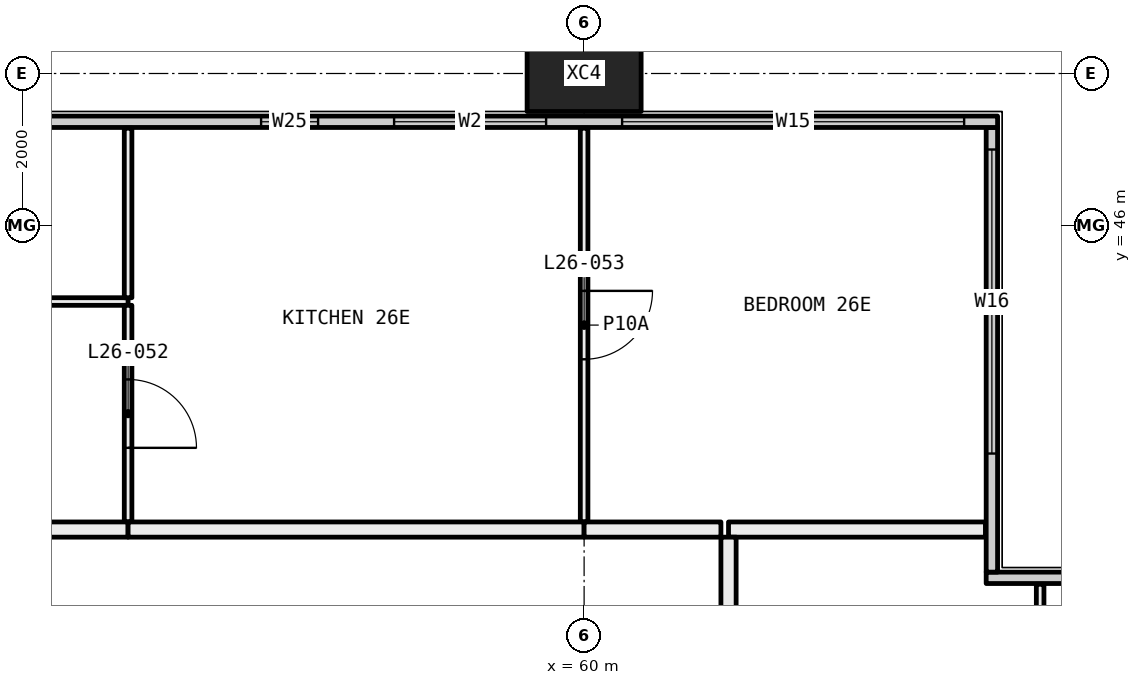
"""IFC4 building model, lengths in metres.
Left out: names, types, materials, properties, quantities, classifications, styles, units other than length and angle.
Written with IfcOpenShell. Run it as: python <this file> out.ifc"""

import sys

from ifc_helpers import new_model, si_unit, direction, frame, frame_2d, origin, origin_2d, place, context, subcontext, project, spatial, rectangle, hollow_rectangle, extrude, element, fill, save


model = new_model("IFC4")
c1 = context("Model", 3, precision=1e-05, world=origin(), true_north=direction((0.0, 1.0)))
c2 = subcontext(c1, "Body", "Model", "MODEL_VIEW")
j1 = project(units=[si_unit("LENGTHUNIT", "METRE"), si_unit("PLANEANGLEUNIT", "RADIAN")], contexts=[c1])
p1 = place(None, origin())
s1 = spatial("IfcSite", under=j1, at=p1, CompositionType="ELEMENT")
p2 = place(p1, origin())
s2 = spatial("IfcBuilding", under=s1, at=p2, CompositionType="ELEMENT")
p3 = place(p2, frame((0.0, 0.0, 103.5)))
s3 = spatial("IfcBuildingStorey", under=s2, at=p3, CompositionType="ELEMENT", Elevation=103.5)
p4 = place(p3, frame((60.0, 48.0, -0.4), z_axis=(0.0, 0.0, 1.0), x_axis=(1.0, 0.0, 0.0)))
e1 = element("IfcColumn", 1, at=p4, inside=s3, PredefinedType="COLUMN", context=c2, shape_type="SweptSolid", body=[
    extrude(hollow_rectangle(XDim=1.5, YDim=1.0, WallThickness=0.06, at=origin_2d()), origin(), (0.0, 0.0, 1.0), 3.45),
])
p5 = place(p3, frame((65.29, 41.365, 0.0), z_axis=(0.0, 0.0, 1.0), x_axis=(1.0, 0.0, 0.0)))
e2 = element("IfcWall", 2, at=p5, inside=s3, PredefinedType="ELEMENTEDWALL", context=c2, shape_type="SweptSolid", body=[
    extrude(rectangle(XDim=6.15, YDim=0.15, at=frame_2d((3.075, 0.0))), origin(), (0.0, 0.0, 1.0), 3.05),
])
p6 = place(p5, frame((1.71, 0.0, 0.45)))
e3 = element("IfcOpeningElement", 3, at=p6, cuts=e2, PredefinedType="OPENING", context=c2, shape_type="SweptSolid", body=[
    extrude(rectangle(XDim=4.0, YDim=2.55, at=frame_2d((2.0, 1.275))), frame((0.0, 0.085, 0.0), z_axis=(0.0, -1.0, 0.0), x_axis=(1.0, 0.0, 0.0)), (0.0, 0.0, 1.0), 0.17),
])
p7 = place(p3, frame((65.365, 41.44, 0.0), z_axis=(0.0, 0.0, 1.0), x_axis=(0.0, 1.0, 0.0)))
e4 = element("IfcWall", 4, at=p7, inside=s3, PredefinedType="ELEMENTEDWALL", context=c2, shape_type="SweptSolid", body=[
    extrude(rectangle(XDim=5.85, YDim=0.15, at=frame_2d((2.925, 0.0))), origin(), (0.0, 0.0, 1.0), 3.05),
])
p8 = place(p7, frame((1.56, 0.0, 0.45)))
e5 = element("IfcOpeningElement", 5, at=p8, cuts=e4, PredefinedType="OPENING", context=c2, shape_type="SweptSolid", body=[
    extrude(rectangle(XDim=4.0, YDim=2.55, at=frame_2d((2.0, 1.275))), frame((0.0, 0.085, 0.0), z_axis=(0.0, -1.0, 0.0), x_axis=(1.0, 0.0, 0.0)), (0.0, 0.0, 1.0), 0.17),
])
p9 = place(p3, frame((6.56, 47.365, 0.0), z_axis=(0.0, 0.0, 1.0), x_axis=(1.0, 0.0, 0.0)))
e6 = element("IfcWall", 6, at=p9, inside=s3, PredefinedType="ELEMENTEDWALL", context=c2, shape_type="SweptSolid", body=[
    extrude(rectangle(XDim=58.88, YDim=0.15, at=frame_2d((29.44, 0.0))), origin(), (0.0, 0.0, 1.0), 3.05),
])
p10 = place(p9, frame((0.44, 0.0, 0.45)))
e7 = element("IfcOpeningElement", 7, at=p10, cuts=e6, PredefinedType="OPENING", context=c2, shape_type="SweptSolid", body=[
    extrude(rectangle(XDim=4.5, YDim=2.55, at=frame_2d((2.25, 1.275))), frame((0.0, 0.085, 0.0), z_axis=(0.0, -1.0, 0.0), x_axis=(1.0, 0.0, 0.0)), (0.0, 0.0, 1.0), 0.17),
])
p11 = place(p9, frame((5.94, 0.0, 0.45)))
e8 = element("IfcOpeningElement", 8, at=p11, cuts=e6, PredefinedType="OPENING", context=c2, shape_type="SweptSolid", body=[
    extrude(rectangle(XDim=3.75, YDim=2.55, at=frame_2d((1.875, 1.275))), frame((0.0, 0.085, 0.0), z_axis=(0.0, -1.0, 0.0), x_axis=(1.0, 0.0, 0.0)), (0.0, 0.0, 1.0), 0.17),
])
p12 = place(p9, frame((13.19, 0.0, 0.45)))
e9 = element("IfcOpeningElement", 9, at=p12, cuts=e6, PredefinedType="OPENING", context=c2, shape_type="SweptSolid", body=[
    extrude(rectangle(XDim=3.75, YDim=2.55, at=frame_2d((1.875, 1.275))), frame((0.0, 0.085, 0.0), z_axis=(0.0, -1.0, 0.0), x_axis=(1.0, 0.0, 0.0)), (0.0, 0.0, 1.0), 0.17),
])
p13 = place(p9, frame((17.94, 0.0, 0.45)))
e10 = element("IfcOpeningElement", 10, at=p13, cuts=e6, PredefinedType="OPENING", context=c2, shape_type="SweptSolid", body=[
    extrude(rectangle(XDim=3.75, YDim=2.55, at=frame_2d((1.875, 1.275))), frame((0.0, 0.085, 0.0), z_axis=(0.0, -1.0, 0.0), x_axis=(1.0, 0.0, 0.0)), (0.0, 0.0, 1.0), 0.17),
])
p14 = place(p9, frame((25.19, 0.0, 0.45)))
e11 = element("IfcOpeningElement", 11, at=p14, cuts=e6, PredefinedType="OPENING", context=c2, shape_type="SweptSolid", body=[
    extrude(rectangle(XDim=0.75, YDim=2.55, at=frame_2d((0.375, 1.275))), frame((0.0, 0.085, 0.0), z_axis=(0.0, -1.0, 0.0), x_axis=(1.0, 0.0, 0.0)), (0.0, 0.0, 1.0), 0.17),
])
p15 = place(p9, frame((26.94, 0.0, 0.45)))
e12 = element("IfcOpeningElement", 12, at=p15, cuts=e6, PredefinedType="OPENING", context=c2, shape_type="SweptSolid", body=[
    extrude(rectangle(XDim=2.0, YDim=2.55, at=frame_2d((1.0, 1.275))), frame((0.0, 0.085, 0.0), z_axis=(0.0, -1.0, 0.0), x_axis=(1.0, 0.0, 0.0)), (0.0, 0.0, 1.0), 0.17),
])
p16 = place(p9, frame((29.94, 0.0, 0.45)))
e13 = element("IfcOpeningElement", 13, at=p16, cuts=e6, PredefinedType="OPENING", context=c2, shape_type="SweptSolid", body=[
    extrude(rectangle(XDim=3.75, YDim=2.55, at=frame_2d((1.875, 1.275))), frame((0.0, 0.085, 0.0), z_axis=(0.0, -1.0, 0.0), x_axis=(1.0, 0.0, 0.0)), (0.0, 0.0, 1.0), 0.17),
])
p17 = place(p9, frame((37.19, 0.0, 0.45)))
e14 = element("IfcOpeningElement", 14, at=p17, cuts=e6, PredefinedType="OPENING", context=c2, shape_type="SweptSolid", body=[
    extrude(rectangle(XDim=3.75, YDim=2.55, at=frame_2d((1.875, 1.275))), frame((0.0, 0.085, 0.0), z_axis=(0.0, -1.0, 0.0), x_axis=(1.0, 0.0, 0.0)), (0.0, 0.0, 1.0), 0.17),
])
p18 = place(p9, frame((41.94, 0.0, 0.45)))
e15 = element("IfcOpeningElement", 15, at=p18, cuts=e6, PredefinedType="OPENING", context=c2, shape_type="SweptSolid", body=[
    extrude(rectangle(XDim=3.75, YDim=2.55, at=frame_2d((1.875, 1.275))), frame((0.0, 0.085, 0.0), z_axis=(0.0, -1.0, 0.0), x_axis=(1.0, 0.0, 0.0)), (0.0, 0.0, 1.0), 0.17),
])
p19 = place(p9, frame((49.19, 0.0, 0.45)))
e16 = element("IfcOpeningElement", 16, at=p19, cuts=e6, PredefinedType="OPENING", context=c2, shape_type="SweptSolid", body=[
    extrude(rectangle(XDim=0.75, YDim=2.55, at=frame_2d((0.375, 1.275))), frame((0.0, 0.085, 0.0), z_axis=(0.0, -1.0, 0.0), x_axis=(1.0, 0.0, 0.0)), (0.0, 0.0, 1.0), 0.17),
])
p20 = place(p9, frame((50.94, 0.0, 0.45)))
e17 = element("IfcOpeningElement", 17, at=p20, cuts=e6, PredefinedType="OPENING", context=c2, shape_type="SweptSolid", body=[
    extrude(rectangle(XDim=2.0, YDim=2.55, at=frame_2d((1.0, 1.275))), frame((0.0, 0.085, 0.0), z_axis=(0.0, -1.0, 0.0), x_axis=(1.0, 0.0, 0.0)), (0.0, 0.0, 1.0), 0.17),
])
p21 = place(p9, frame((53.94, 0.0, 0.45)))
e18 = element("IfcOpeningElement", 18, at=p21, cuts=e6, PredefinedType="OPENING", context=c2, shape_type="SweptSolid", body=[
    extrude(rectangle(XDim=4.5, YDim=2.55, at=frame_2d((2.25, 1.275))), frame((0.0, 0.085, 0.0), z_axis=(0.0, -1.0, 0.0), x_axis=(1.0, 0.0, 0.0)), (0.0, 0.0, 1.0), 0.17),
])
p22 = place(p3, frame((66.0, 41.28, 0.0), z_axis=(0.0, 0.0, 1.0), x_axis=(0.0, -1.0, 0.0)))
e19 = element("IfcWall", 19, at=p22, inside=s3, PredefinedType="PARTITIONING", context=c2, shape_type="SweptSolid", body=[
    extrude(rectangle(XDim=3.78, YDim=0.1, at=frame_2d((1.89, 0.0))), origin(), (0.0, 0.0, 1.0), 3.05),
])
p23 = place(p3, frame((65.28, 42.0, 0.0), z_axis=(0.0, 0.0, 1.0), x_axis=(-1.0, 0.0, 0.0)))
e20 = element("IfcWall", 20, at=p23, inside=s3, PredefinedType="PARTITIONING", context=c2, shape_type="SweptSolid", body=[
    extrude(rectangle(XDim=3.38, YDim=0.2, at=frame_2d((1.69, 0.0))), origin(), (0.0, 0.0, 1.0), 3.05),
])
p24 = place(p3, frame((61.9, 41.9, 0.0), z_axis=(0.0, 0.0, 1.0), x_axis=(0.0, -1.0, 0.0)))
e21 = element("IfcWall", 21, at=p24, inside=s3, PredefinedType="PARTITIONING", context=c2, shape_type="SweptSolid", body=[
    extrude(rectangle(XDim=4.4, YDim=0.2, at=frame_2d((2.2, 0.0))), origin(), (0.0, 0.0, 1.0), 3.05),
])
p25 = place(p3, frame((54.0, 45.0, 0.0), z_axis=(0.0, 0.0, 1.0), x_axis=(-1.0, 0.0, 0.0)))
e22 = element("IfcWall", 22, at=p25, inside=s3, PredefinedType="PARTITIONING", context=c2, shape_type="SweptSolid", body=[
    extrude(rectangle(XDim=17.925, YDim=0.1, at=frame_2d((8.962, 0.0))), origin(), (0.0, 0.0, 1.0), 2.45),
])
p26 = place(p25, frame((8.512, 0.0, 0.0)))
e23 = element("IfcOpeningElement", 23, at=p26, cuts=e22, PredefinedType="OPENING", context=c2, shape_type="SweptSolid", body=[
    extrude(rectangle(XDim=0.9, YDim=2.1, at=frame_2d((0.45, 1.05))), frame((0.0, 0.06, 0.0), z_axis=(0.0, -1.0, 0.0), x_axis=(1.0, 0.0, 0.0)), (0.0, 0.0, 1.0), 0.12),
])
p27 = place(p3, frame((54.0, 42.1, 0.0), z_axis=(0.0, 0.0, 1.0), x_axis=(0.0, 1.0, 0.0)))
e24 = element("IfcWall", 24, at=p27, inside=s3, PredefinedType="PARTITIONING", context=c2, shape_type="SweptSolid", body=[
    extrude(rectangle(XDim=2.85, YDim=0.1, at=frame_2d((1.425, 0.0))), origin(), (0.0, 0.0, 1.0), 3.05),
])
p28 = place(p27, frame((0.975, 0.0, 0.0)))
e25 = element("IfcOpeningElement", 25, at=p28, cuts=e24, PredefinedType="OPENING", context=c2, shape_type="SweptSolid", body=[
    extrude(rectangle(XDim=0.9, YDim=2.1, at=frame_2d((0.45, 1.05))), frame((0.0, 0.06, 0.0), z_axis=(0.0, -1.0, 0.0), x_axis=(1.0, 0.0, 0.0)), (0.0, 0.0, 1.0), 0.12),
])
p29 = place(p3, frame((46.1, 42.0, 0.0), z_axis=(0.0, 0.0, 1.0), x_axis=(1.0, 0.0, 0.0)))
e26 = element("IfcWall", 26, at=p29, inside=s3, PredefinedType="PARTITIONING", context=c2, shape_type="SweptSolid", body=[
    extrude(rectangle(XDim=7.9, YDim=0.2, at=frame_2d((3.95, 0.0))), origin(), (0.0, 0.0, 1.0), 3.05),
])
p30 = place(p3, frame((54.0, 45.05, 0.0), z_axis=(0.0, 0.0, 1.0), x_axis=(0.0, 1.0, 0.0)))
e27 = element("IfcWall", 27, at=p30, inside=s3, PredefinedType="PARTITIONING", context=c2, shape_type="SweptSolid", body=[
    extrude(rectangle(XDim=2.23, YDim=0.1, at=frame_2d((1.115, 0.0))), origin(), (0.0, 0.0, 1.0), 3.05),
])
p31 = place(p3, frame((60.0, 42.1, 0.0), z_axis=(0.0, 0.0, 1.0), x_axis=(0.0, 1.0, 0.0)))
e28 = element("IfcWall", 28, at=p31, inside=s3, PredefinedType="PARTITIONING", context=c2, shape_type="SweptSolid", body=[
    extrude(rectangle(XDim=5.18, YDim=0.1, at=frame_2d((2.59, 0.0))), origin(), (0.0, 0.0, 1.0), 3.05),
])
p32 = place(p31, frame((2.14, 0.0, 0.0)))
e29 = element("IfcOpeningElement", 29, at=p32, cuts=e28, PredefinedType="OPENING", context=c2, shape_type="SweptSolid", body=[
    extrude(rectangle(XDim=0.9, YDim=2.1, at=frame_2d((0.45, 1.05))), frame((0.0, 0.06, 0.0), z_axis=(0.0, -1.0, 0.0), x_axis=(1.0, 0.0, 0.0)), (0.0, 0.0, 1.0), 0.12),
])
p33 = place(p3, frame((54.0, 42.0, 0.0), z_axis=(0.0, 0.0, 1.0), x_axis=(1.0, 0.0, 0.0)))
e30 = element("IfcWall", 30, at=p33, inside=s3, PredefinedType="PARTITIONING", context=c2, shape_type="SweptSolid", body=[
    extrude(rectangle(XDim=6.0, YDim=0.2, at=frame_2d((3.0, 0.0))), origin(), (0.0, 0.0, 1.0), 3.05),
])
p34 = place(p3, frame((60.0, 42.0, 0.0), z_axis=(0.0, 0.0, 1.0), x_axis=(1.0, 0.0, 0.0)))
e31 = element("IfcWall", 31, at=p34, inside=s3, PredefinedType="PARTITIONING", context=c2, shape_type="SweptSolid", body=[
    extrude(rectangle(XDim=1.8, YDim=0.2, at=frame_2d((0.9, 0.0))), origin(), (0.0, 0.0, 1.0), 3.05),
])
p35 = place(p8, origin())
e32 = element("IfcWindow", 32, at=p35, inside=s3, PartitioningType="SINGLE_PANEL", PredefinedType="WINDOW", context=c2, shape_type="SweptSolid", body=[
    extrude(rectangle(XDim=4.0, YDim=2.55, at=frame_2d((2.0, 1.275))), frame((0.0, 0.03, 0.0), z_axis=(0.0, -1.0, 0.0), x_axis=(1.0, 0.0, 0.0)), (0.0, 0.0, 1.0), 0.06),
])
fill(e5, e32)
p36 = place(p19, origin())
e33 = element("IfcWindow", 33, at=p36, inside=s3, PartitioningType="SINGLE_PANEL", PredefinedType="WINDOW", context=c2, shape_type="SweptSolid", body=[
    extrude(rectangle(XDim=0.75, YDim=2.55, at=frame_2d((0.375, 1.275))), frame((0.0, 0.03, 0.0), z_axis=(0.0, -1.0, 0.0), x_axis=(1.0, 0.0, 0.0)), (0.0, 0.0, 1.0), 0.06),
])
fill(e16, e33)
p37 = place(p20, origin())
e34 = element("IfcWindow", 34, at=p37, inside=s3, PartitioningType="SINGLE_PANEL", PredefinedType="WINDOW", context=c2, shape_type="SweptSolid", body=[
    extrude(rectangle(XDim=2.0, YDim=2.55, at=frame_2d((1.0, 1.275))), frame((0.0, 0.03, 0.0), z_axis=(0.0, -1.0, 0.0), x_axis=(1.0, 0.0, 0.0)), (0.0, 0.0, 1.0), 0.06),
])
fill(e17, e34)
p38 = place(p21, origin())
e35 = element("IfcWindow", 35, at=p38, inside=s3, PartitioningType="SINGLE_PANEL", PredefinedType="WINDOW", context=c2, shape_type="SweptSolid", body=[
    extrude(rectangle(XDim=4.5, YDim=2.55, at=frame_2d((2.25, 1.275))), frame((0.0, 0.03, 0.0), z_axis=(0.0, -1.0, 0.0), x_axis=(1.0, 0.0, 0.0)), (0.0, 0.0, 1.0), 0.06),
])
fill(e18, e35)
p39 = place(p28, frame((0.9, 0.0, 0.0), x_axis=(-1.0, 0.0, 0.0)))
e36 = element("IfcDoor", 36, at=p39, inside=s3, OperationType="SINGLE_SWING_LEFT", PredefinedType="DOOR", context=c2, shape_type="SweptSolid", body=[
    extrude(rectangle(XDim=0.9, YDim=2.1, at=frame_2d((0.45, 1.05))), frame((0.0, 0.025, 0.0), z_axis=(0.0, -1.0, 0.0), x_axis=(1.0, 0.0, 0.0)), (0.0, 0.0, 1.0), 0.05),
])
fill(e25, e36)
p40 = place(p32, frame((0.9, 0.0, 0.0), x_axis=(-1.0, 0.0, 0.0)))
e37 = element("IfcDoor", 37, at=p40, inside=s3, OperationType="SINGLE_SWING_RIGHT", PredefinedType="DOOR", context=c2, shape_type="SweptSolid", body=[
    extrude(rectangle(XDim=0.9, YDim=2.1, at=frame_2d((0.45, 1.05))), frame((0.0, 0.025, 0.0), z_axis=(0.0, -1.0, 0.0), x_axis=(1.0, 0.0, 0.0)), (0.0, 0.0, 1.0), 0.05),
])
fill(e29, e37)
save(model, sys.argv[1])
